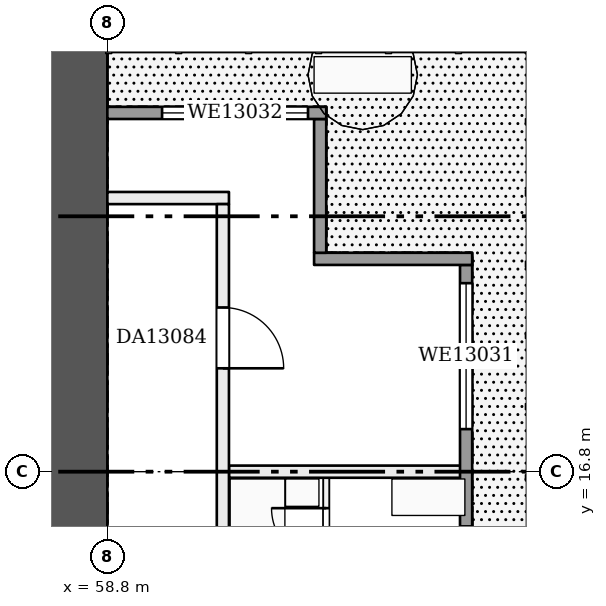
"""IFC4 building model, lengths in metres.
Left out: names, types, materials, properties, quantities, classifications, styles, units other than length and angle.
Written with IfcOpenShell. Run it as: python <this file> out.ifc"""

import sys

from ifc_helpers import new_model, si_unit, direction, frame, frame_2d, origin, place, context, subcontext, project, spatial, rectangle, extrude, element, fill, save


model = new_model("IFC4")
c1 = context("Model", 3, precision=1e-05, world=origin(), true_north=direction((0.0, 1.0)))
c2 = subcontext(c1, "Body", "Model", "MODEL_VIEW")
j1 = project(units=[si_unit("LENGTHUNIT", "METRE"), si_unit("PLANEANGLEUNIT", "RADIAN")], contexts=[c1])
p1 = place(None, origin())
s1 = spatial("IfcSite", under=j1, at=p1, CompositionType="ELEMENT")
p2 = place(p1, origin())
s2 = spatial("IfcBuilding", under=s1, at=p2, CompositionType="ELEMENT")
p3 = place(p2, frame((0.0, 0.0, 56.7)))
s3 = spatial("IfcBuildingStorey", under=s2, at=p3, CompositionType="ELEMENT", Elevation=56.7)
p4 = place(p3, frame((58.2, 9.6, 0.0), z_axis=(0.0, 0.0, 1.0), x_axis=(0.0, 1.0, 0.0)))
e1 = element("IfcWall", 1, at=p4, inside=s3, PredefinedType="SHEAR", context=c2, shape_type="SweptSolid", body=[
    extrude(rectangle(XDim=14.4, YDim=1.2, at=frame_2d((7.2, 0.0))), origin(), (0.0, 0.0, 1.0), 3.22),
])
p5 = place(p4, frame((2.1, 0.0, 0.0)))
e2 = element("IfcOpeningElement", 2, at=p5, cuts=e1, PredefinedType="OPENING", context=c2, shape_type="SweptSolid", body=[
    extrude(rectangle(XDim=1.8, YDim=2.1, at=frame_2d((0.9, 1.05))), frame((0.0, 0.61, 0.0), z_axis=(0.0, -1.0, 0.0), x_axis=(1.0, 0.0, 0.0)), (0.0, 0.0, 1.0), 1.22),
])
p6 = place(p3, frame((60.8, 16.8, 0.0), z_axis=(0.0, 0.0, 1.0), x_axis=(1.0, 0.0, 0.0)))
e3 = element("IfcWall", 3, at=p6, inside=s3, PredefinedType="PARTITIONING", context=c2, shape_type="SweptSolid", body=[
    extrude(rectangle(XDim=3.9, YDim=0.2, at=frame_2d((1.95, 0.0))), origin(), (0.0, 0.0, 1.0), 3.22),
])
p7 = place(p3, frame((58.8, 21.3, 0.0), z_axis=(0.0, 0.0, 1.0), x_axis=(1.0, 0.0, 0.0)))
e4 = element("IfcWall", 4, at=p7, inside=s3, PredefinedType="PARTITIONING", context=c2, shape_type="SweptSolid", body=[
    extrude(rectangle(XDim=2.0, YDim=0.2, at=frame_2d((1.0, 0.0))), origin(), (0.0, 0.0, 1.0), 3.22),
])
p8 = place(p3, frame((60.7, 6.6, 0.0), z_axis=(0.0, 0.0, 1.0), x_axis=(0.0, 1.0, 0.0)))
e5 = element("IfcWall", 5, at=p8, inside=s3, PredefinedType="PARTITIONING", context=c2, shape_type="SweptSolid", body=[
    extrude(rectangle(XDim=14.6, YDim=0.2, at=frame_2d((7.3, 0.0))), origin(), (0.0, 0.0, 1.0), 3.22),
])
p9 = place(p8, frame((6.5, 0.0, 0.0)))
e6 = element("IfcOpeningElement", 6, at=p9, cuts=e5, PredefinedType="OPENING", context=c2, shape_type="SweptSolid", body=[
    extrude(rectangle(XDim=1.0, YDim=2.1, at=frame_2d((0.5, 1.05))), frame((0.0, 0.11, 0.0), z_axis=(0.0, -1.0, 0.0), x_axis=(1.0, 0.0, 0.0)), (0.0, 0.0, 1.0), 0.22),
])
p10 = place(p8, frame((11.9, 0.0, 0.0)))
e7 = element("IfcOpeningElement", 7, at=p10, cuts=e5, PredefinedType="OPENING", context=c2, shape_type="SweptSolid", body=[
    extrude(rectangle(XDim=1.0, YDim=2.1, at=frame_2d((0.5, 1.05))), frame((0.0, 0.11, 0.0), z_axis=(0.0, -1.0, 0.0), x_axis=(1.0, 0.0, 0.0)), (0.0, 0.0, 1.0), 0.22),
])
p11 = place(p3, frame((62.4, 12.65, 0.0), z_axis=(0.0, 0.0, 1.0), x_axis=(0.0, 1.0, 0.0)))
e8 = element("IfcWall", 8, at=p11, inside=s3, PredefinedType="PARTITIONING", context=c2, shape_type="SweptSolid", body=[
    extrude(rectangle(XDim=4.05, YDim=0.1, at=frame_2d((2.025, 0.0))), origin(), (0.0, 0.0, 1.0), 3.22),
])
p12 = place(p11, frame((0.55, 0.0, 0.0)))
e9 = element("IfcOpeningElement", 9, at=p12, cuts=e8, PredefinedType="OPENING", context=c2, shape_type="SweptSolid", body=[
    extrude(rectangle(XDim=0.9, YDim=2.1, at=frame_2d((0.45, 1.05))), frame((0.0, 0.06, 0.0), z_axis=(0.0, -1.0, 0.0), x_axis=(1.0, 0.0, 0.0)), (0.0, 0.0, 1.0), 0.12),
])
p13 = place(p11, frame((2.65, 0.0, 0.0)))
e10 = element("IfcOpeningElement", 10, at=p13, cuts=e8, PredefinedType="OPENING", context=c2, shape_type="SweptSolid", body=[
    extrude(rectangle(XDim=0.9, YDim=2.1, at=frame_2d((0.45, 1.05))), frame((0.0, 0.06, 0.0), z_axis=(0.0, -1.0, 0.0), x_axis=(1.0, 0.0, 0.0)), (0.0, 0.0, 1.0), 0.12),
])
p14 = place(p3, frame((64.7, 5.0, 0.0), z_axis=(0.0, 0.0, 1.0), x_axis=(0.0, 1.0, 0.0)))
e11 = element("IfcWall", 11, at=p14, inside=s3, PredefinedType="SOLIDWALL", context=c2, shape_type="SweptSolid", body=[
    extrude(rectangle(XDim=15.2, YDim=0.2, at=frame_2d((7.6, 0.0))), origin(), (0.0, 0.0, 1.0), 3.22),
])
p15 = place(p14, frame((0.3, 0.0, 0.9)))
e12 = element("IfcOpeningElement", 12, at=p15, cuts=e11, PredefinedType="OPENING", context=c2, shape_type="SweptSolid", body=[
    extrude(rectangle(XDim=2.4, YDim=1.5, at=frame_2d((1.2, 0.75))), frame((0.0, 0.11, 0.0), z_axis=(0.0, -1.0, 0.0), x_axis=(1.0, 0.0, 0.0)), (0.0, 0.0, 1.0), 0.22),
])
p16 = place(p14, frame((4.3, 0.0, 0.0)))
e13 = element("IfcOpeningElement", 13, at=p16, cuts=e11, PredefinedType="OPENING", context=c2, shape_type="SweptSolid", body=[
    extrude(rectangle(XDim=2.4, YDim=2.2, at=frame_2d((1.2, 1.1))), frame((0.0, 0.11, 0.0), z_axis=(0.0, -1.0, 0.0), x_axis=(1.0, 0.0, 0.0)), (0.0, 0.0, 1.0), 0.22),
])
p17 = place(p14, frame((8.5, 0.0, 0.9)))
e14 = element("IfcOpeningElement", 14, at=p17, cuts=e11, PredefinedType="OPENING", context=c2, shape_type="SweptSolid", body=[
    extrude(rectangle(XDim=2.4, YDim=1.5, at=frame_2d((1.2, 0.75))), frame((0.0, 0.11, 0.0), z_axis=(0.0, -1.0, 0.0), x_axis=(1.0, 0.0, 0.0)), (0.0, 0.0, 1.0), 0.22),
])
p18 = place(p14, frame((12.5, 0.0, 0.9)))
e15 = element("IfcOpeningElement", 15, at=p18, cuts=e11, PredefinedType="OPENING", context=c2, shape_type="SweptSolid", body=[
    extrude(rectangle(XDim=2.4, YDim=1.5, at=frame_2d((1.2, 0.75))), frame((0.0, 0.11, 0.0), z_axis=(0.0, -1.0, 0.0), x_axis=(1.0, 0.0, 0.0)), (0.0, 0.0, 1.0), 0.22),
])
p19 = place(p3, frame((64.8, 20.3, 0.0), z_axis=(0.0, 0.0, 1.0), x_axis=(-1.0, 0.0, 0.0)))
e16 = element("IfcWall", 16, at=p19, inside=s3, PredefinedType="SOLIDWALL", context=c2, shape_type="SweptSolid", body=[
    extrude(rectangle(XDim=2.6, YDim=0.2, at=frame_2d((1.3, 0.0))), origin(), (0.0, 0.0, 1.0), 3.22),
])
p20 = place(p3, frame((62.3, 20.4, 0.0), z_axis=(0.0, 0.0, 1.0), x_axis=(0.0, 1.0, 0.0)))
e17 = element("IfcWall", 17, at=p20, inside=s3, PredefinedType="SOLIDWALL", context=c2, shape_type="SweptSolid", body=[
    extrude(rectangle(XDim=2.2, YDim=0.2, at=frame_2d((1.1, 0.0))), origin(), (0.0, 0.0, 1.0), 3.22),
])
p21 = place(p3, frame((62.4, 22.7, 0.0), z_axis=(0.0, 0.0, 1.0), x_axis=(-1.0, 0.0, 0.0)))
e18 = element("IfcWall", 18, at=p21, inside=s3, PredefinedType="SOLIDWALL", context=c2, shape_type="SweptSolid", body=[
    extrude(rectangle(XDim=3.6, YDim=0.2, at=frame_2d((1.8, 0.0))), origin(), (0.0, 0.0, 1.0), 3.22),
])
p22 = place(p21, frame((0.3, 0.0, 0.9)))
e19 = element("IfcOpeningElement", 19, at=p22, cuts=e18, PredefinedType="OPENING", context=c2, shape_type="SweptSolid", body=[
    extrude(rectangle(XDim=2.4, YDim=1.5, at=frame_2d((1.2, 0.75))), frame((0.0, 0.11, 0.0), z_axis=(0.0, -1.0, 0.0), x_axis=(1.0, 0.0, 0.0)), (0.0, 0.0, 1.0), 0.22),
])
p23 = place(p10, frame((1.0, 0.0, 0.0), z_axis=(0.0, 0.0, 1.0), x_axis=(-1.0, 0.0, 0.0)))
e20 = element("IfcDoor", 20, at=p23, inside=s3, OperationType="SINGLE_SWING_RIGHT", PredefinedType="DOOR", context=c2, shape_type="SweptSolid", body=[
    extrude(rectangle(XDim=1.0, YDim=2.1, at=frame_2d((0.5, 1.05))), frame((0.0, 0.025, 0.0), z_axis=(0.0, -1.0, 0.0), x_axis=(1.0, 0.0, 0.0)), (0.0, 0.0, 1.0), 0.05),
])
fill(e7, e20)
p24 = place(p13, origin())
e21 = element("IfcDoor", 21, at=p24, inside=s3, OperationType="SINGLE_SWING_RIGHT", PredefinedType="DOOR", context=c2, shape_type="SweptSolid", body=[
    extrude(rectangle(XDim=0.9, YDim=2.1, at=frame_2d((0.45, 1.05))), frame((0.0, 0.025, 0.0), z_axis=(0.0, -1.0, 0.0), x_axis=(1.0, 0.0, 0.0)), (0.0, 0.0, 1.0), 0.05),
])
fill(e10, e21)
p25 = place(p18, origin())
e22 = element("IfcWindow", 22, at=p25, inside=s3, PartitioningType="SINGLE_PANEL", PredefinedType="WINDOW", context=c2, shape_type="SweptSolid", body=[
    extrude(rectangle(XDim=2.4, YDim=1.5, at=frame_2d((1.2, 0.75))), frame((0.0, 0.03, 0.0), z_axis=(0.0, -1.0, 0.0), x_axis=(1.0, 0.0, 0.0)), (0.0, 0.0, 1.0), 0.06),
])
fill(e15, e22)
p26 = place(p22, origin())
e23 = element("IfcWindow", 23, at=p26, inside=s3, PartitioningType="SINGLE_PANEL", PredefinedType="WINDOW", context=c2, shape_type="SweptSolid", body=[
    extrude(rectangle(XDim=2.4, YDim=1.5, at=frame_2d((1.2, 0.75))), frame((0.0, 0.03, 0.0), z_axis=(0.0, -1.0, 0.0), x_axis=(1.0, 0.0, 0.0)), (0.0, 0.0, 1.0), 0.06),
])
fill(e19, e23)
save(model, sys.argv[1])
